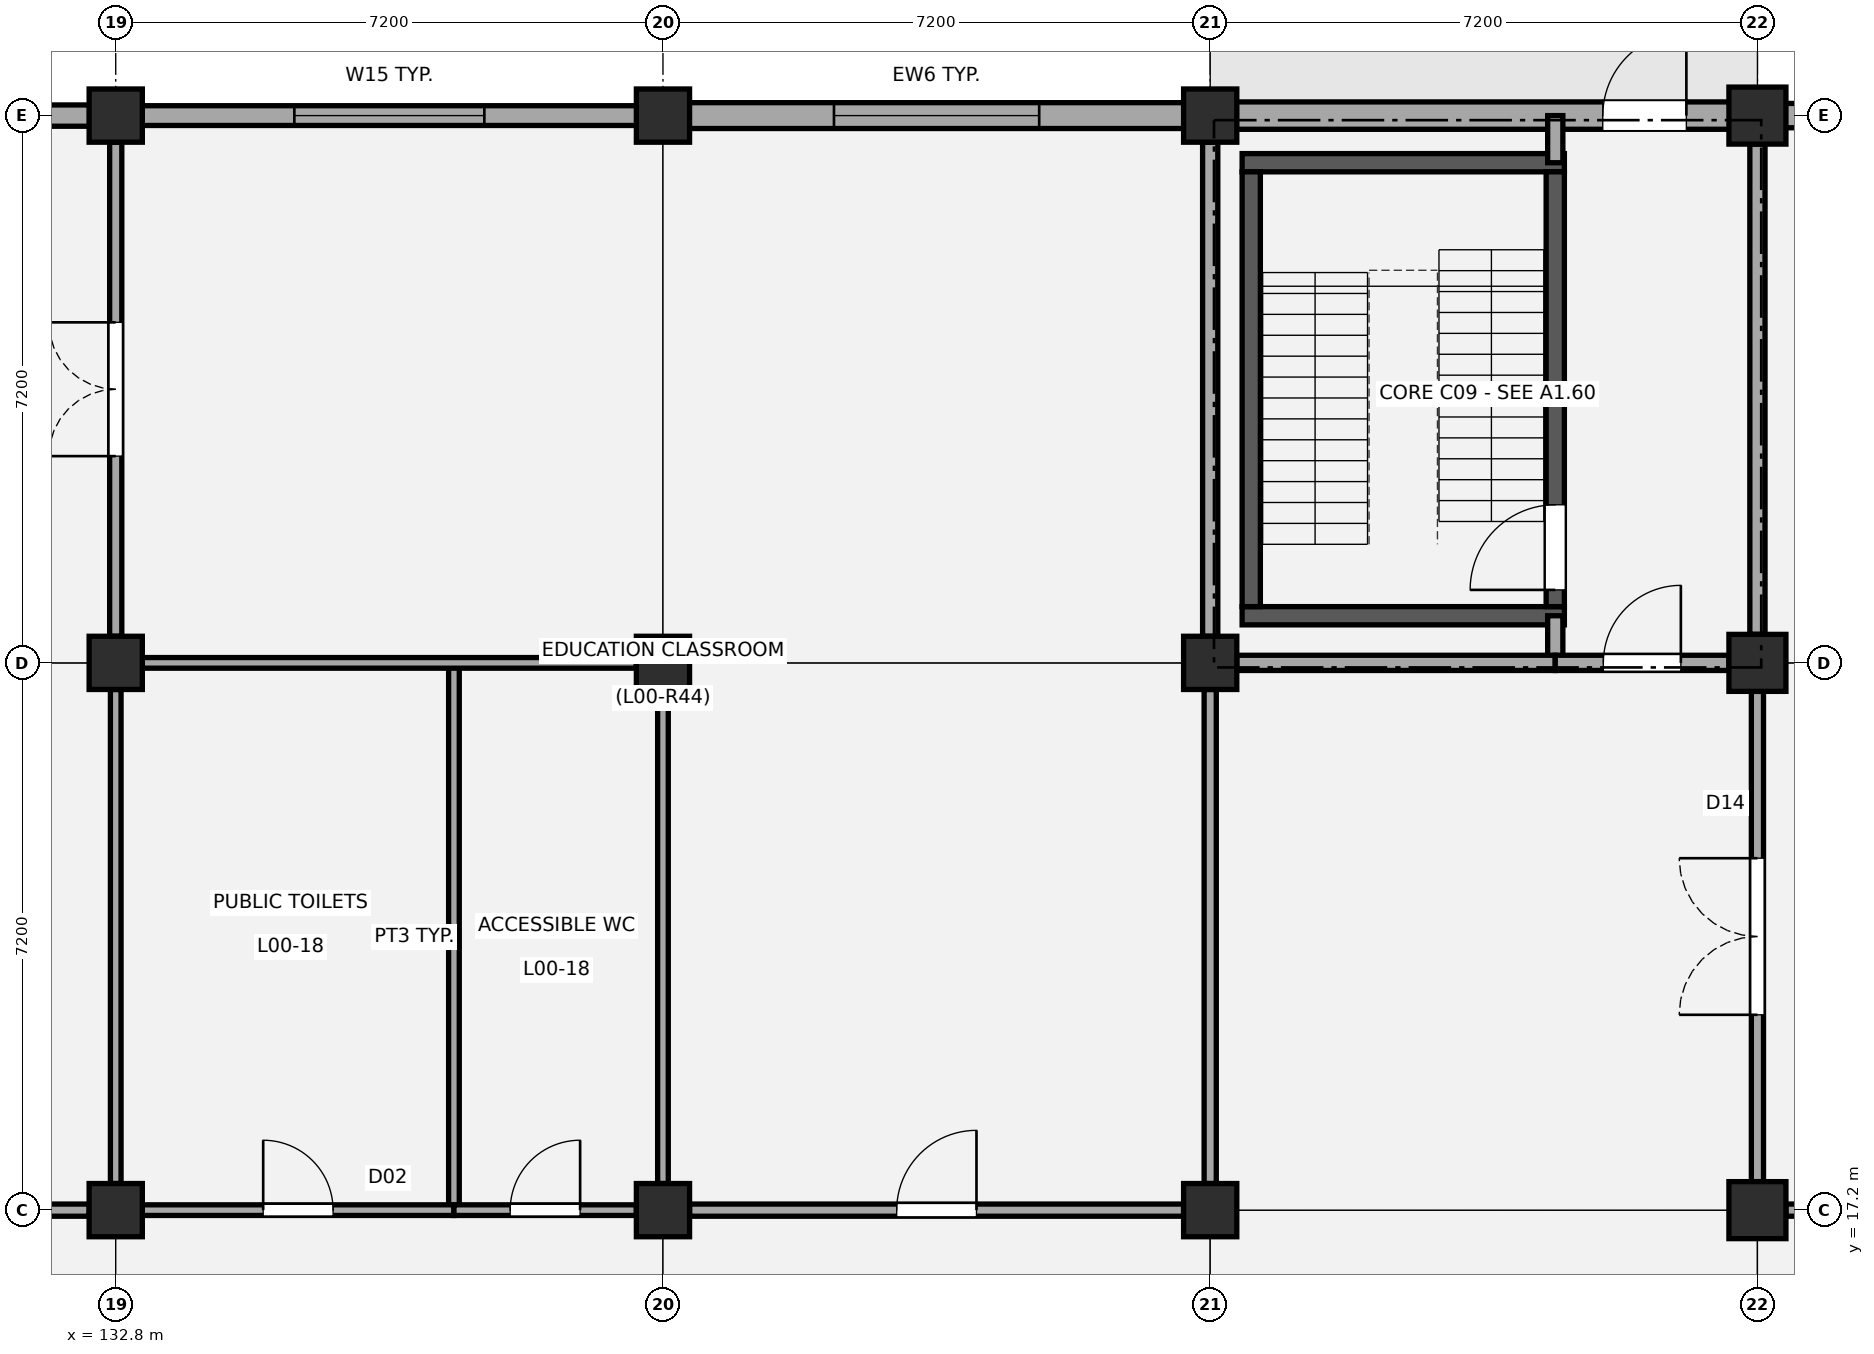
"""IFC4 building model, lengths in metres.
Left out: names, types, materials, properties, quantities, classifications, styles, units other than length and angle.
Written with IfcOpenShell. Run it as: python <this file> out.ifc"""

import sys

from ifc_helpers import new_model, si_unit, direction, frame, frame_2d, origin, origin_2d, place, context, subcontext, project, spatial, rectangle, circle, extrude, element, fill, save


model = new_model("IFC4")
c1 = context("Model", 3, precision=1e-05, world=origin(), true_north=direction((0.0, 1.0)))
c2 = subcontext(c1, "Body", "Model", "MODEL_VIEW")
j1 = project(units=[si_unit("LENGTHUNIT", "METRE"), si_unit("PLANEANGLEUNIT", "RADIAN")], contexts=[c1])
p1 = place(None, origin())
s1 = spatial("IfcSite", under=j1, at=p1, CompositionType="ELEMENT")
p2 = place(p1, origin())
s2 = spatial("IfcBuilding", under=s1, at=p2, CompositionType="ELEMENT")
p3 = place(p2, origin())
s3 = spatial("IfcBuildingStorey", under=s2, at=p3, CompositionType="ELEMENT", Elevation=0.0)
for number, where, z_axis, x_axis in (
    (1, (132.8, 17.2, -0.35), (0.0, 0.0, 1.0), (1.0, 0.0, 0.0)),
    (2, (132.8, 24.4, -0.35), (0.0, 0.0, 1.0), (1.0, 0.0, 0.0)),
    (3, (132.8, 31.6, -0.35), (0.0, 0.0, 1.0), (1.0, 0.0, 0.0)),
    (4, (140.0, 17.2, -0.35), (0.0, 0.0, 1.0), (1.0, 0.0, 0.0)),
    (5, (140.0, 24.4, -0.35), (0.0, 0.0, 1.0), (1.0, 0.0, 0.0)),
    (6, (140.0, 31.6, -0.35), (0.0, 0.0, 1.0), (1.0, 0.0, 0.0)),
    (7, (147.2, 17.2, -0.35), (0.0, 0.0, 1.0), (1.0, 0.0, 0.0)),
    (8, (147.2, 24.4, -0.35), (0.0, 0.0, 1.0), (1.0, 0.0, 0.0)),
    (9, (147.2, 31.6, -0.35), (0.0, 0.0, 1.0), (1.0, 0.0, 0.0)),
):
    element("IfcColumn", number, at=place(p3, frame(where, z_axis=z_axis, x_axis=x_axis)), inside=s3, PredefinedType="COLUMN", context=c2, shape_type="SweptSolid", body=[
        extrude(rectangle(XDim=0.7, YDim=0.7, at=origin_2d()), origin(), (0.0, 0.0, 1.0), 5.03),
    ])
for number, where, z_axis, x_axis in (
    (10, (154.4, 17.2, -0.35), (0.0, 0.0, 1.0), (1.0, 0.0, 0.0)),
    (11, (154.4, 24.4, -0.35), (0.0, 0.0, 1.0), (1.0, 0.0, 0.0)),
    (12, (154.4, 31.6, -0.35), (0.0, 0.0, 1.0), (1.0, 0.0, 0.0)),
):
    element("IfcColumn", number, at=place(p3, frame(where, z_axis=z_axis, x_axis=x_axis)), inside=s3, PredefinedType="COLUMN", context=c2, shape_type="SweptSolid", body=[
        extrude(circle(Radius=0.375, at=origin_2d()), origin(), (0.0, 0.0, 1.0), 5.03),
    ])
p4 = place(p3, frame((125.945, 31.6, 0.0), z_axis=(0.0, 0.0, 1.0), x_axis=(1.0, 0.0, 0.0)))
e13 = element("IfcWall", 13, at=p4, inside=s3, PredefinedType="STANDARD", context=c2, shape_type="SweptSolid", body=[
    extrude(rectangle(XDim=6.51, YDim=0.28, at=frame_2d((3.255, 0.0))), origin(), (0.0, 0.0, 1.0), 3.67),
])
p5 = place(p4, frame((2.105, 0.0, 0.95)))
e14 = element("IfcOpeningElement", 14, at=p5, cuts=e13, PredefinedType="OPENING", context=c2, shape_type="SweptSolid", body=[
    extrude(rectangle(XDim=2.3, YDim=1.5, at=frame_2d((1.15, 0.75))), frame((0.0, 0.15, 0.0), z_axis=(0.0, -1.0, 0.0), x_axis=(1.0, 0.0, 0.0)), (0.0, 0.0, 1.0), 0.3),
])
p6 = place(p3, frame((133.145, 31.6, 0.0), z_axis=(0.0, 0.0, 1.0), x_axis=(1.0, 0.0, 0.0)))
e15 = element("IfcWall", 15, at=p6, inside=s3, PredefinedType="STANDARD", context=c2, shape_type="SweptSolid", body=[
    extrude(rectangle(XDim=6.51, YDim=0.26, at=frame_2d((3.255, 0.0))), origin(), (0.0, 0.0, 1.0), 3.67),
])
p7 = place(p6, frame((2.005, 0.0, 0.95)))
e16 = element("IfcOpeningElement", 16, at=p7, cuts=e15, PredefinedType="OPENING", context=c2, shape_type="SweptSolid", body=[
    extrude(rectangle(XDim=2.5, YDim=1.6, at=frame_2d((1.25, 0.8))), frame((0.0, 0.14, 0.0), z_axis=(0.0, -1.0, 0.0), x_axis=(1.0, 0.0, 0.0)), (0.0, 0.0, 1.0), 0.28),
])
p8 = place(p3, frame((140.345, 31.6, 0.0), z_axis=(0.0, 0.0, 1.0), x_axis=(1.0, 0.0, 0.0)))
e17 = element("IfcWall", 17, at=p8, inside=s3, PredefinedType="STANDARD", context=c2, shape_type="SweptSolid", body=[
    extrude(rectangle(XDim=6.51, YDim=0.34, at=frame_2d((3.255, 0.0))), origin(), (0.0, 0.0, 1.0), 3.67),
])
p9 = place(p8, frame((1.905, 0.0, 0.95)))
e18 = element("IfcOpeningElement", 18, at=p9, cuts=e17, PredefinedType="OPENING", context=c2, shape_type="SweptSolid", body=[
    extrude(rectangle(XDim=2.7, YDim=1.7, at=frame_2d((1.35, 0.85))), frame((0.0, 0.18, 0.0), z_axis=(0.0, -1.0, 0.0), x_axis=(1.0, 0.0, 0.0)), (0.0, 0.0, 1.0), 0.36),
])
p10 = place(p3, frame((147.545, 31.6, 0.0), z_axis=(0.0, 0.0, 1.0), x_axis=(1.0, 0.0, 0.0)))
e19 = element("IfcWall", 19, at=p10, inside=s3, PredefinedType="STANDARD", context=c2, shape_type="SweptSolid", body=[
    extrude(rectangle(XDim=6.545, YDim=0.36, at=frame_2d((3.272, 0.0))), origin(), (0.0, 0.0, 1.0), 3.67),
])
p11 = place(p10, frame((4.82, 0.0, 0.0)))
e20 = element("IfcOpeningElement", 20, at=p11, cuts=e19, PredefinedType="OPENING", context=c2, shape_type="SweptSolid", body=[
    extrude(rectangle(XDim=1.1, YDim=2.15, at=frame_2d((0.55, 1.075))), frame((0.0, 0.19, 0.0), z_axis=(0.0, -1.0, 0.0), x_axis=(1.0, 0.0, 0.0)), (0.0, 0.0, 1.0), 0.38),
])
p12 = place(p3, frame((154.71, 31.6, 0.0), z_axis=(0.0, 0.0, 1.0), x_axis=(1.0, 0.0, 0.0)))
e21 = element("IfcWall", 21, at=p12, inside=s3, PredefinedType="STANDARD", context=c2, shape_type="SweptSolid", body=[
    extrude(rectangle(XDim=6.58, YDim=0.32, at=frame_2d((3.29, 0.0))), origin(), (0.0, 0.0, 1.0), 3.75),
])
p13 = place(p12, frame((1.79, 0.0, 0.95)))
e22 = element("IfcOpeningElement", 22, at=p13, cuts=e21, PredefinedType="OPENING", context=c2, shape_type="SweptSolid", body=[
    extrude(rectangle(XDim=3.0, YDim=1.85, at=frame_2d((1.5, 0.925))), frame((0.0, 0.17, 0.0), z_axis=(0.0, -1.0, 0.0), x_axis=(1.0, 0.0, 0.0)), (0.0, 0.0, 1.0), 0.34),
])
for number, where, z_axis, x_axis in (
    (23, (147.62, 25.02, 0.0), (0.0, 0.0, 1.0), (1.0, 0.0, 0.0)),
    (24, (147.62, 30.98, 0.0), (0.0, 0.0, 1.0), (1.0, 0.0, 0.0)),
):
    element("IfcWall", number, at=place(p3, frame(where, z_axis=z_axis, x_axis=x_axis)), inside=s3, PredefinedType="SHEAR", context=c2, shape_type="SweptSolid", body=[
        extrude(rectangle(XDim=4.24, YDim=0.24, at=frame_2d((2.12, 0.0))), origin(), (0.0, 0.0, 1.0), 4.38),
    ])
p14 = place(p3, frame((147.74, 25.14, 0.0), z_axis=(0.0, 0.0, 1.0), x_axis=(0.0, 1.0, 0.0)))
e25 = element("IfcWall", 25, at=p14, inside=s3, PredefinedType="SHEAR", context=c2, shape_type="SweptSolid", body=[
    extrude(rectangle(XDim=5.72, YDim=0.24, at=frame_2d((2.86, 0.0))), origin(), (0.0, 0.0, 1.0), 4.38),
])
p15 = place(p3, frame((151.74, 25.14, 0.0), z_axis=(0.0, 0.0, 1.0), x_axis=(0.0, 1.0, 0.0)))
e26 = element("IfcWall", 26, at=p15, inside=s3, PredefinedType="SHEAR", context=c2, shape_type="SweptSolid", body=[
    extrude(rectangle(XDim=5.72, YDim=0.24, at=frame_2d((2.86, 0.0))), origin(), (0.0, 0.0, 1.0), 4.38),
])
p16 = place(p15, frame((0.22, 0.0, 0.0)))
e27 = element("IfcOpeningElement", 27, at=p16, cuts=e26, PredefinedType="OPENING", context=c2, shape_type="SweptSolid", body=[
    extrude(rectangle(XDim=1.12, YDim=2.15, at=frame_2d((0.56, 1.075))), frame((0.0, 0.13, 0.0), z_axis=(0.0, -1.0, 0.0), x_axis=(1.0, 0.0, 0.0)), (0.0, 0.0, 1.0), 0.26),
])
p17 = place(p3, frame((151.74, 24.4, 0.0), z_axis=(0.0, 0.0, 1.0), x_axis=(0.0, 1.0, 0.0)))
e28 = element("IfcWall", 28, at=p17, inside=s3, PredefinedType="PARTITIONING", context=c2, shape_type="SweptSolid", body=[
    extrude(rectangle(XDim=0.62, YDim=0.2, at=frame_2d((0.31, 0.0))), origin(), (0.0, 0.0, 1.0), 3.62),
])
p18 = place(p3, frame((151.74, 30.98, 0.0), z_axis=(0.0, 0.0, 1.0), x_axis=(0.0, 1.0, 0.0)))
e29 = element("IfcWall", 29, at=p18, inside=s3, PredefinedType="PARTITIONING", context=c2, shape_type="SweptSolid", body=[
    extrude(rectangle(XDim=0.62, YDim=0.2, at=frame_2d((0.31, 0.0))), origin(), (0.0, 0.0, 1.0), 3.67),
])
p19 = place(p3, frame((147.2, 24.75, 0.0), z_axis=(0.0, 0.0, 1.0), x_axis=(0.0, 1.0, 0.0)))
e30 = element("IfcWall", 30, at=p19, inside=s3, PredefinedType="PARTITIONING", context=c2, shape_type="SweptSolid", body=[
    extrude(rectangle(XDim=6.5, YDim=0.2, at=frame_2d((3.25, 0.0))), origin(), (0.0, 0.0, 1.0), 3.62),
])
p20 = place(p3, frame((154.4, 24.775, 0.0), z_axis=(0.0, 0.0, 1.0), x_axis=(0.0, 1.0, 0.0)))
e31 = element("IfcWall", 31, at=p20, inside=s3, PredefinedType="PARTITIONING", context=c2, shape_type="SweptSolid", body=[
    extrude(rectangle(XDim=6.45, YDim=0.2, at=frame_2d((3.225, 0.0))), origin(), (0.0, 0.0, 1.0), 3.62),
])
p21 = place(p3, frame((147.55, 24.4, 0.0), z_axis=(0.0, 0.0, 1.0), x_axis=(1.0, 0.0, 0.0)))
e32 = element("IfcWall", 32, at=p21, inside=s3, PredefinedType="PARTITIONING", context=c2, shape_type="SweptSolid", body=[
    extrude(rectangle(XDim=4.19, YDim=0.2, at=frame_2d((2.095, 0.0))), origin(), (0.0, 0.0, 1.0), 3.62),
])
p22 = place(p3, frame((151.74, 24.4, 0.0), z_axis=(0.0, 0.0, 1.0), x_axis=(1.0, 0.0, 0.0)))
e33 = element("IfcWall", 33, at=p22, inside=s3, PredefinedType="PARTITIONING", context=c2, shape_type="SweptSolid", body=[
    extrude(rectangle(XDim=2.285, YDim=0.2, at=frame_2d((1.143, 0.0))), origin(), (0.0, 0.0, 1.0), 3.62),
])
p23 = place(p22, frame((0.633, 0.0, 0.0)))
e34 = element("IfcOpeningElement", 34, at=p23, cuts=e33, PredefinedType="OPENING", context=c2, shape_type="SweptSolid", body=[
    extrude(rectangle(XDim=1.02, YDim=2.15, at=frame_2d((0.51, 1.075))), frame((0.0, 0.11, 0.0), z_axis=(0.0, -1.0, 0.0), x_axis=(1.0, 0.0, 0.0)), (0.0, 0.0, 1.0), 0.22),
])
p24 = place(p3, frame((137.25, 17.2, 0.0), z_axis=(0.0, 0.0, 1.0), x_axis=(0.0, 1.0, 0.0)))
e35 = element("IfcWall", 35, at=p24, inside=s3, PredefinedType="PARTITIONING", context=c2, shape_type="SweptSolid", body=[
    extrude(rectangle(XDim=7.2, YDim=0.14, at=frame_2d((3.6, 0.0))), origin(), (0.0, 0.0, 1.0), 3.8),
])
p25 = place(p3, frame((133.15, 17.2, 0.0), z_axis=(0.0, 0.0, 1.0), x_axis=(1.0, 0.0, 0.0)))
e36 = element("IfcWall", 36, at=p25, inside=s3, PredefinedType="PARTITIONING", context=c2, shape_type="SweptSolid", body=[
    extrude(rectangle(XDim=4.1, YDim=0.14, at=frame_2d((2.05, 0.0))), origin(), (0.0, 0.0, 1.0), 3.52),
])
p26 = place(p25, frame((1.59, 0.0, 0.0)))
e37 = element("IfcOpeningElement", 37, at=p26, cuts=e36, PredefinedType="OPENING", context=c2, shape_type="SweptSolid", body=[
    extrude(rectangle(XDim=0.92, YDim=2.08, at=frame_2d((0.46, 1.04))), frame((0.0, 0.08, 0.0), z_axis=(0.0, -1.0, 0.0), x_axis=(1.0, 0.0, 0.0)), (0.0, 0.0, 1.0), 0.16),
])
p27 = place(p3, frame((137.25, 17.2, 0.0), z_axis=(0.0, 0.0, 1.0), x_axis=(1.0, 0.0, 0.0)))
e38 = element("IfcWall", 38, at=p27, inside=s3, PredefinedType="PARTITIONING", context=c2, shape_type="SweptSolid", body=[
    extrude(rectangle(XDim=2.4, YDim=0.14, at=frame_2d((1.2, 0.0))), origin(), (0.0, 0.0, 1.0), 3.52),
])
p28 = place(p27, frame((0.74, 0.0, 0.0)))
e39 = element("IfcOpeningElement", 39, at=p28, cuts=e38, PredefinedType="OPENING", context=c2, shape_type="SweptSolid", body=[
    extrude(rectangle(XDim=0.92, YDim=2.08, at=frame_2d((0.46, 1.04))), frame((0.0, 0.08, 0.0), z_axis=(0.0, -1.0, 0.0), x_axis=(1.0, 0.0, 0.0)), (0.0, 0.0, 1.0), 0.16),
])
for number, where, z_axis, x_axis in (
    (40, (133.15, 24.4, 0.0), (0.0, 0.0, 1.0), (1.0, 0.0, 0.0)),
    (41, (132.8, 17.55, 0.0), (0.0, 0.0, 1.0), (0.0, 1.0, 0.0)),
    (42, (140.0, 17.55, 0.0), (0.0, 0.0, 1.0), (0.0, 1.0, 0.0)),
):
    element("IfcWall", number, at=place(p3, frame(where, z_axis=z_axis, x_axis=x_axis)), inside=s3, PredefinedType="PARTITIONING", context=c2, shape_type="SweptSolid", body=[
        extrude(rectangle(XDim=6.5, YDim=0.14, at=frame_2d((3.25, 0.0))), origin(), (0.0, 0.0, 1.0), 3.62),
    ])
p29 = place(p3, frame((125.95, 17.2, 0.0), z_axis=(0.0, 0.0, 1.0), x_axis=(1.0, 0.0, 0.0)))
e43 = element("IfcWall", 43, at=p29, inside=s3, PredefinedType="PARTITIONING", context=c2, shape_type="SweptSolid", body=[
    extrude(rectangle(XDim=6.5, YDim=0.16, at=frame_2d((3.25, 0.0))), origin(), (0.0, 0.0, 1.0), 3.62),
])
p30 = place(p3, frame((132.8, 24.75, 0.0), z_axis=(0.0, 0.0, 1.0), x_axis=(0.0, 1.0, 0.0)))
e44 = element("IfcWall", 44, at=p30, inside=s3, PredefinedType="PARTITIONING", context=c2, shape_type="SweptSolid", body=[
    extrude(rectangle(XDim=6.5, YDim=0.16, at=frame_2d((3.25, 0.0))), origin(), (0.0, 0.0, 1.0), 3.62),
])
p31 = place(p30, frame((2.37, 0.0, 0.0)))
e45 = element("IfcOpeningElement", 45, at=p31, cuts=e44, PredefinedType="OPENING", context=c2, shape_type="SweptSolid", body=[
    extrude(rectangle(XDim=1.76, YDim=2.22, at=frame_2d((0.88, 1.11))), frame((0.0, 0.09, 0.0), z_axis=(0.0, -1.0, 0.0), x_axis=(1.0, 0.0, 0.0)), (0.0, 0.0, 1.0), 0.18),
])
p32 = place(p3, frame((140.35, 17.2, 0.0), z_axis=(0.0, 0.0, 1.0), x_axis=(1.0, 0.0, 0.0)))
e46 = element("IfcWall", 46, at=p32, inside=s3, PredefinedType="PARTITIONING", context=c2, shape_type="SweptSolid", body=[
    extrude(rectangle(XDim=6.5, YDim=0.16, at=frame_2d((3.25, 0.0))), origin(), (0.0, 0.0, 1.0), 3.62),
])
p33 = place(p32, frame((2.725, 0.0, 0.0)))
e47 = element("IfcOpeningElement", 47, at=p33, cuts=e46, PredefinedType="OPENING", context=c2, shape_type="SweptSolid", body=[
    extrude(rectangle(XDim=1.05, YDim=2.14, at=frame_2d((0.525, 1.07))), frame((0.0, 0.09, 0.0), z_axis=(0.0, -1.0, 0.0), x_axis=(1.0, 0.0, 0.0)), (0.0, 0.0, 1.0), 0.18),
])
p34 = place(p3, frame((147.2, 17.55, 0.0), z_axis=(0.0, 0.0, 1.0), x_axis=(0.0, 1.0, 0.0)))
e48 = element("IfcWall", 48, at=p34, inside=s3, PredefinedType="PARTITIONING", context=c2, shape_type="SweptSolid", body=[
    extrude(rectangle(XDim=6.5, YDim=0.16, at=frame_2d((3.25, 0.0))), origin(), (0.0, 0.0, 1.0), 3.62),
])
p35 = place(p3, frame((154.4, 17.575, 0.0), z_axis=(0.0, 0.0, 1.0), x_axis=(0.0, 1.0, 0.0)))
e49 = element("IfcWall", 49, at=p35, inside=s3, PredefinedType="PARTITIONING", context=c2, shape_type="SweptSolid", body=[
    extrude(rectangle(XDim=6.45, YDim=0.16, at=frame_2d((3.225, 0.0))), origin(), (0.0, 0.0, 1.0), 3.62),
])
p36 = place(p35, frame((2.195, 0.0, 0.0)))
e50 = element("IfcOpeningElement", 50, at=p36, cuts=e49, PredefinedType="OPENING", context=c2, shape_type="SweptSolid", body=[
    extrude(rectangle(XDim=2.06, YDim=2.28, at=frame_2d((1.03, 1.14))), frame((0.0, 0.09, 0.0), z_axis=(0.0, -1.0, 0.0), x_axis=(1.0, 0.0, 0.0)), (0.0, 0.0, 1.0), 0.18),
])
p37 = place(p3, frame((154.775, 17.2, 0.0), z_axis=(0.0, 0.0, 1.0), x_axis=(1.0, 0.0, 0.0)))
e51 = element("IfcWall", 51, at=p37, inside=s3, PredefinedType="PARTITIONING", context=c2, shape_type="SweptSolid", body=[
    extrude(rectangle(XDim=6.45, YDim=0.16, at=frame_2d((3.225, 0.0))), origin(), (0.0, 0.0, 1.0), 3.7),
])
p38 = place(p7, origin())
e52 = element("IfcWindow", 52, at=p38, inside=s3, PartitioningType="SINGLE_PANEL", PredefinedType="WINDOW", context=c2, shape_type="SweptSolid", body=[
    extrude(rectangle(XDim=2.5, YDim=1.6, at=frame_2d((1.25, 0.8))), frame((0.0, 0.03, 0.0), z_axis=(0.0, -1.0, 0.0), x_axis=(1.0, 0.0, 0.0)), (0.0, 0.0, 1.0), 0.06),
])
fill(e16, e52)
p39 = place(p9, origin())
e53 = element("IfcWindow", 53, at=p39, inside=s3, PartitioningType="SINGLE_PANEL", PredefinedType="WINDOW", context=c2, shape_type="SweptSolid", body=[
    extrude(rectangle(XDim=2.7, YDim=1.7, at=frame_2d((1.35, 0.85))), frame((0.0, 0.03, 0.0), z_axis=(0.0, -1.0, 0.0), x_axis=(1.0, 0.0, 0.0)), (0.0, 0.0, 1.0), 0.06),
])
fill(e18, e53)
p40 = place(p11, origin())
e54 = element("IfcDoor", 54, at=p40, inside=s3, OperationType="SINGLE_SWING_RIGHT", PredefinedType="DOOR", context=c2, shape_type="SweptSolid", body=[
    extrude(rectangle(XDim=1.1, YDim=2.15, at=frame_2d((0.55, 1.075))), frame((0.0, 0.025, 0.0), z_axis=(0.0, -1.0, 0.0), x_axis=(1.0, 0.0, 0.0)), (0.0, 0.0, 1.0), 0.05),
])
fill(e20, e54)
p41 = place(p16, origin())
e55 = element("IfcDoor", 55, at=p41, inside=s3, OperationType="SINGLE_SWING_LEFT", PredefinedType="DOOR", context=c2, shape_type="SweptSolid", body=[
    extrude(rectangle(XDim=1.12, YDim=2.15, at=frame_2d((0.56, 1.075))), frame((0.0, 0.025, 0.0), z_axis=(0.0, -1.0, 0.0), x_axis=(1.0, 0.0, 0.0)), (0.0, 0.0, 1.0), 0.05),
])
fill(e27, e55)
p42 = place(p23, origin())
e56 = element("IfcDoor", 56, at=p42, inside=s3, OperationType="SINGLE_SWING_RIGHT", PredefinedType="DOOR", context=c2, shape_type="SweptSolid", body=[
    extrude(rectangle(XDim=1.02, YDim=2.15, at=frame_2d((0.51, 1.075))), frame((0.0, 0.025, 0.0), z_axis=(0.0, -1.0, 0.0), x_axis=(1.0, 0.0, 0.0)), (0.0, 0.0, 1.0), 0.05),
])
fill(e34, e56)
p43 = place(p26, origin())
e57 = element("IfcDoor", 57, at=p43, inside=s3, OperationType="SINGLE_SWING_LEFT", PredefinedType="DOOR", context=c2, shape_type="SweptSolid", body=[
    extrude(rectangle(XDim=0.92, YDim=2.08, at=frame_2d((0.46, 1.04))), frame((0.0, 0.025, 0.0), z_axis=(0.0, -1.0, 0.0), x_axis=(1.0, 0.0, 0.0)), (0.0, 0.0, 1.0), 0.05),
])
fill(e37, e57)
p44 = place(p28, origin())
e58 = element("IfcDoor", 58, at=p44, inside=s3, OperationType="SINGLE_SWING_RIGHT", PredefinedType="DOOR", context=c2, shape_type="SweptSolid", body=[
    extrude(rectangle(XDim=0.92, YDim=2.08, at=frame_2d((0.46, 1.04))), frame((0.0, 0.025, 0.0), z_axis=(0.0, -1.0, 0.0), x_axis=(1.0, 0.0, 0.0)), (0.0, 0.0, 1.0), 0.05),
])
fill(e39, e58)
p45 = place(p33, origin())
e59 = element("IfcDoor", 59, at=p45, inside=s3, OperationType="SINGLE_SWING_RIGHT", PredefinedType="DOOR", context=c2, shape_type="SweptSolid", body=[
    extrude(rectangle(XDim=1.05, YDim=2.14, at=frame_2d((0.525, 1.07))), frame((0.0, 0.025, 0.0), z_axis=(0.0, -1.0, 0.0), x_axis=(1.0, 0.0, 0.0)), (0.0, 0.0, 1.0), 0.05),
])
fill(e47, e59)
p46 = place(p36, origin())
e60 = element("IfcDoor", 60, at=p46, inside=s3, OperationType="DOUBLE_DOOR_SINGLE_SWING", PredefinedType="DOOR", context=c2, shape_type="SweptSolid", body=[
    extrude(rectangle(XDim=2.06, YDim=2.28, at=frame_2d((1.03, 1.14))), frame((0.0, 0.025, 0.0), z_axis=(0.0, -1.0, 0.0), x_axis=(1.0, 0.0, 0.0)), (0.0, 0.0, 1.0), 0.05),
])
fill(e50, e60)
p47 = place(p31, origin())
e61 = element("IfcDoor", 61, at=p47, inside=s3, OperationType="DOUBLE_DOOR_SINGLE_SWING", PredefinedType="DOOR", context=c2, shape_type="SweptSolid", body=[
    extrude(rectangle(XDim=1.76, YDim=2.22, at=frame_2d((0.88, 1.11))), frame((0.0, 0.025, 0.0), z_axis=(0.0, -1.0, 0.0), x_axis=(1.0, 0.0, 0.0)), (0.0, 0.0, 1.0), 0.05),
])
fill(e45, e61)
save(model, sys.argv[1])
